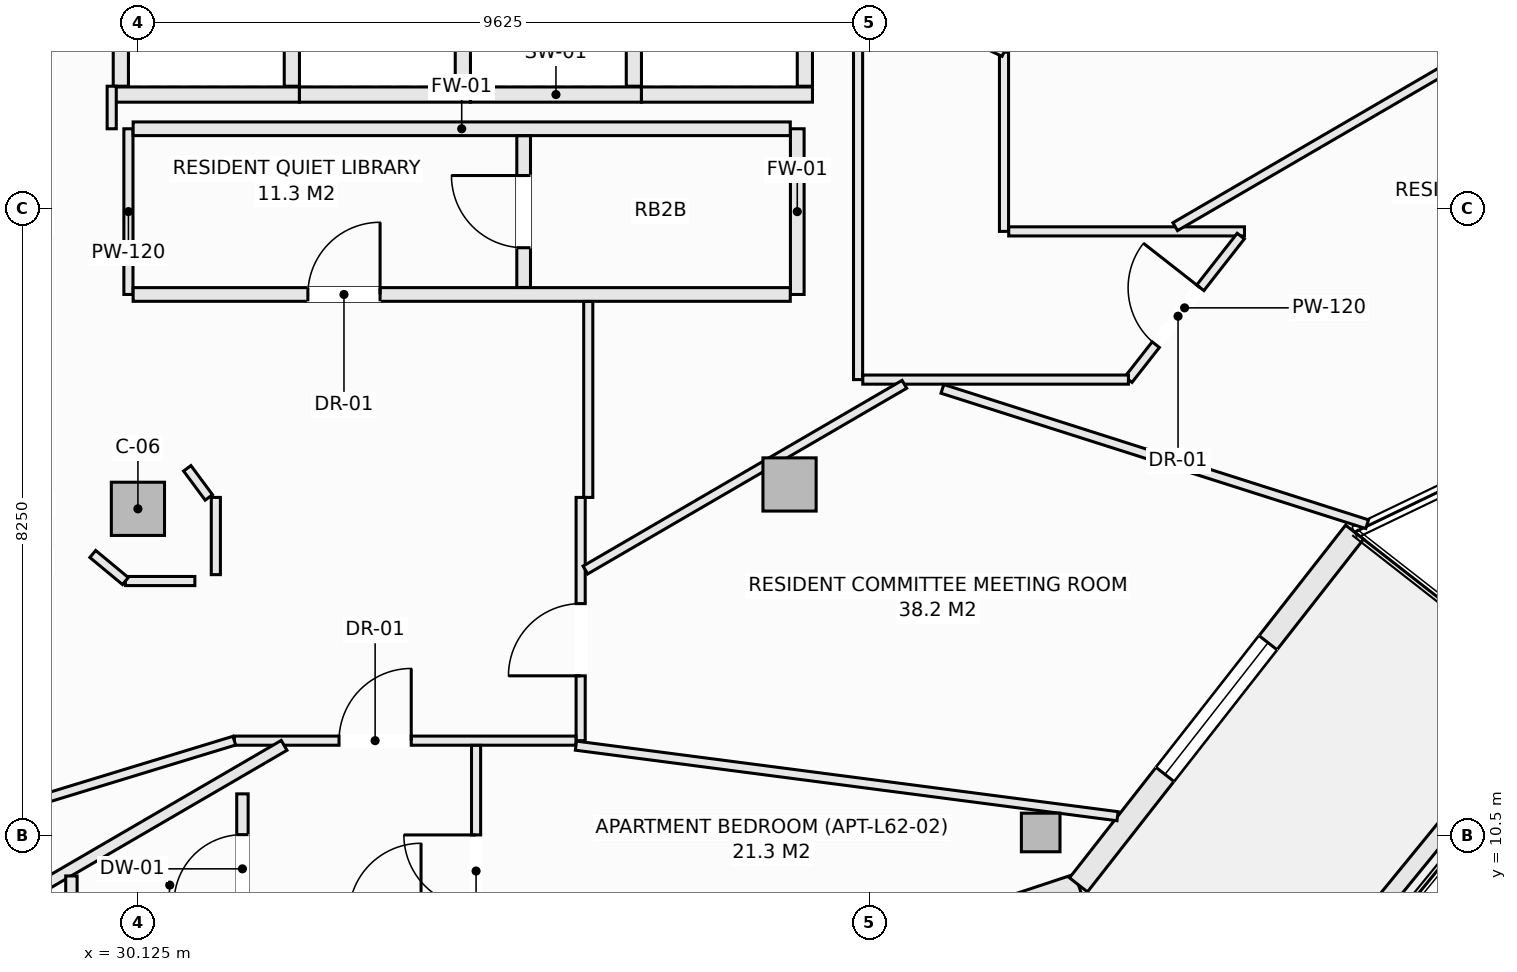
"""IFC4 building model, lengths in metres.
Left out: names, types, materials, properties, quantities, classifications, styles, units other than length and angle.
Written with IfcOpenShell. Run it as: python <this file> out.ifc"""

import sys

from ifc_helpers import new_model, si_unit, direction, frame, frame_2d, origin, origin_2d, place, context, subcontext, project, spatial, rectangle, hollow_rectangle, extrude, element, fill, save


model = new_model("IFC4")
c1 = context("Model", 3, precision=1e-05, world=origin(), true_north=direction((0.0, 1.0)))
c2 = subcontext(c1, "Body", "Model", "MODEL_VIEW")
j1 = project(units=[si_unit("LENGTHUNIT", "METRE"), si_unit("PLANEANGLEUNIT", "RADIAN")], contexts=[c1])
p1 = place(None, origin())
s1 = spatial("IfcSite", under=j1, at=p1, CompositionType="ELEMENT")
p2 = place(p1, origin())
s2 = spatial("IfcBuilding", under=s1, at=p2, CompositionType="ELEMENT")
p3 = place(p2, frame((0.0, 0.0, 232.7)))
s3 = spatial("IfcBuildingStorey", under=s2, at=p3, CompositionType="ELEMENT", Elevation=232.7)
p4 = place(p3, frame((42.003, 10.542, -0.27), z_axis=(0.0, 0.0, 1.0), x_axis=(1.0, 0.0, 0.0)))
e1 = element("IfcColumn", 1, at=p4, inside=s3, PredefinedType="COLUMN", context=c2, shape_type="SweptSolid", body=[
    extrude(hollow_rectangle(XDim=0.508, YDim=0.508, WallThickness=0.019, at=origin_2d()), origin(), (0.0, 0.0, 1.0), 3.3),
])
for number, where, z_axis, x_axis in (
    (2, (30.125, 14.8, -0.27), (0.0, 0.0, 1.0), (1.0, 0.0, 0.0)),
    (3, (38.698, 15.121, -0.27), (0.0, 0.0, 1.0), (1.0, 0.0, 0.0)),
):
    element("IfcColumn", number, at=place(p3, frame(where, z_axis=z_axis, x_axis=x_axis)), inside=s3, PredefinedType="COLUMN", context=c2, shape_type="SweptSolid", body=[
        extrude(rectangle(XDim=0.7, YDim=0.7, at=origin_2d()), origin(), (0.0, 0.0, 1.0), 3.3),
    ])
p5 = place(p3, frame((36.531, 7.875, 0.0), z_axis=(0.0, 0.0, 1.0), x_axis=(0.949240877604, 0.314550085495, 0.0)))
e4 = element("IfcWall", 4, at=p5, inside=s3, PredefinedType="SOLIDWALL", context=c2, shape_type="SweptSolid", body=[
    extrude(rectangle(XDim=6.288, YDim=0.3, at=frame_2d((3.144, 0.0))), origin(), (0.0, 0.0, 1.0), 2.605),
])
p6 = place(p5, frame((2.244, 0.0, 0.0)))
e5 = element("IfcOpeningElement", 5, at=p6, cuts=e4, PredefinedType="OPENING", context=c2, shape_type="SweptSolid", body=[
    extrude(rectangle(XDim=1.8, YDim=2.25, at=frame_2d((0.9, 1.125))), frame((0.0, 0.16, 0.0), z_axis=(0.0, -1.0, 0.0), x_axis=(1.0, 0.0, 0.0)), (0.0, 0.0, 1.0), 0.32),
])
p7 = place(p3, frame((42.5, 9.853, 0.0), z_axis=(0.0, 0.0, 1.0), x_axis=(0.616450126935, 0.787393955401, 0.0)))
e6 = element("IfcWall", 6, at=p7, inside=s3, PredefinedType="SOLIDWALL", context=c2, shape_type="SweptSolid", body=[
    extrude(rectangle(XDim=5.893, YDim=0.3, at=frame_2d((2.946, 0.0))), origin(), (0.0, 0.0, 1.0), 2.605),
])
p8 = place(p7, frame((1.846, 0.0, 0.72)))
e7 = element("IfcOpeningElement", 7, at=p8, cuts=e6, PredefinedType="OPENING", context=c2, shape_type="SweptSolid", body=[
    extrude(rectangle(XDim=2.2, YDim=1.65, at=frame_2d((1.1, 0.825))), frame((0.0, 0.16, 0.0), z_axis=(0.0, -1.0, 0.0), x_axis=(1.0, 0.0, 0.0)), (0.0, 0.0, 1.0), 0.32),
])
p9 = place(p3, frame((44.448, 7.087, 0.0), z_axis=(0.0, 0.0, 1.0), x_axis=(0.632697312147, 0.774399193699, 0.0)))
e8 = element("IfcWall", 8, at=p9, inside=s3, PredefinedType="PARAPET", context=c2, shape_type="SweptSolid", body=[
    extrude(rectangle(XDim=6.914, YDim=0.22, at=frame_2d((3.457, 0.0))), origin(), (0.0, 0.0, 1.0), 0.52),
])
p10 = place(p3, frame((29.8, 20.25, 0.0), z_axis=(0.0, 0.0, 1.0), x_axis=(1.0, 0.0, 0.0)))
e9 = element("IfcWall", 9, at=p10, inside=s3, PredefinedType="SOLIDWALL", context=c2, shape_type="SweptSolid", body=[
    extrude(rectangle(XDim=2.45, YDim=0.2, at=frame_2d((1.225, 0.0))), origin(), (0.0, 0.0, 1.0), 3.03),
])
for number, where, z_axis, x_axis in (
    (10, (29.9, 20.36, 0.0), (0.0, 0.0, 1.0), (0.0, 1.0, 0.0)),
    (11, (32.15, 20.36, 0.0), (0.0, 0.0, 1.0), (0.0, 1.0, 0.0)),
):
    element("IfcWall", number, at=place(p3, frame(where, z_axis=z_axis, x_axis=x_axis)), inside=s3, PredefinedType="SOLIDWALL", context=c2, shape_type="SweptSolid", body=[
        extrude(rectangle(XDim=2.43, YDim=0.2, at=frame_2d((1.215, 0.0))), origin(), (0.0, 0.0, 1.0), 3.03),
    ])
p11 = place(p3, frame((32.25, 20.25, 0.0), z_axis=(0.0, 0.0, 1.0), x_axis=(1.0, 0.0, 0.0)))
e12 = element("IfcWall", 12, at=p11, inside=s3, PredefinedType="SOLIDWALL", context=c2, shape_type="SweptSolid", body=[
    extrude(rectangle(XDim=2.25, YDim=0.2, at=frame_2d((1.125, 0.0))), origin(), (0.0, 0.0, 1.0), 3.03),
])
p12 = place(p3, frame((34.4, 20.36, 0.0), z_axis=(0.0, 0.0, 1.0), x_axis=(0.0, 1.0, 0.0)))
e13 = element("IfcWall", 13, at=p12, inside=s3, PredefinedType="SOLIDWALL", context=c2, shape_type="SweptSolid", body=[
    extrude(rectangle(XDim=2.43, YDim=0.2, at=frame_2d((1.215, 0.0))), origin(), (0.0, 0.0, 1.0), 3.03),
])
p13 = place(p3, frame((34.5, 20.25, 0.0), z_axis=(0.0, 0.0, 1.0), x_axis=(1.0, 0.0, 0.0)))
e14 = element("IfcWall", 14, at=p13, inside=s3, PredefinedType="SOLIDWALL", context=c2, shape_type="SweptSolid", body=[
    extrude(rectangle(XDim=2.25, YDim=0.2, at=frame_2d((1.125, 0.0))), origin(), (0.0, 0.0, 1.0), 3.03),
])
p14 = place(p3, frame((36.65, 20.36, 0.0), z_axis=(0.0, 0.0, 1.0), x_axis=(0.0, 1.0, 0.0)))
e15 = element("IfcWall", 15, at=p14, inside=s3, PredefinedType="SOLIDWALL", context=c2, shape_type="SweptSolid", body=[
    extrude(rectangle(XDim=2.43, YDim=0.2, at=frame_2d((1.215, 0.0))), origin(), (0.0, 0.0, 1.0), 3.03),
])
p15 = place(p3, frame((36.75, 20.25, 0.0), z_axis=(0.0, 0.0, 1.0), x_axis=(1.0, 0.0, 0.0)))
e16 = element("IfcWall", 16, at=p15, inside=s3, PredefinedType="SOLIDWALL", context=c2, shape_type="SweptSolid", body=[
    extrude(rectangle(XDim=2.25, YDim=0.2, at=frame_2d((1.125, 0.0))), origin(), (0.0, 0.0, 1.0), 3.03),
])
p16 = place(p3, frame((38.9, 20.36, 0.0), z_axis=(0.0, 0.0, 1.0), x_axis=(0.0, 1.0, 0.0)))
e17 = element("IfcWall", 17, at=p16, inside=s3, PredefinedType="SOLIDWALL", context=c2, shape_type="SweptSolid", body=[
    extrude(rectangle(XDim=2.43, YDim=0.2, at=frame_2d((1.215, 0.0))), origin(), (0.0, 0.0, 1.0), 3.03),
])
p17 = place(p3, frame((30.0, 17.62, 0.0), z_axis=(0.0, 0.0, 1.0), x_axis=(0.0, 1.0, 0.0)))
e18 = element("IfcWall", 18, at=p17, inside=s3, PredefinedType="PARTITIONING", context=c2, shape_type="SweptSolid", body=[
    extrude(rectangle(XDim=2.18, YDim=0.12, at=frame_2d((1.09, 0.0))), origin(), (0.0, 0.0, 1.0), 3.03),
])
p18 = place(p3, frame((38.8, 17.62, 0.0), z_axis=(0.0, 0.0, 1.0), x_axis=(0.0, 1.0, 0.0)))
e19 = element("IfcWall", 19, at=p18, inside=s3, PredefinedType="SOLIDWALL", context=c2, shape_type="SweptSolid", body=[
    extrude(rectangle(XDim=2.18, YDim=0.18, at=frame_2d((1.09, 0.0))), origin(), (0.0, 0.0, 1.0), 3.03),
])
p19 = place(p3, frame((30.062, 17.62, 0.0), z_axis=(0.0, 0.0, 1.0), x_axis=(1.0, 0.0, 0.0)))
e20 = element("IfcWall", 20, at=p19, inside=s3, PredefinedType="SOLIDWALL", context=c2, shape_type="SweptSolid", body=[
    extrude(rectangle(XDim=8.646, YDim=0.18, at=frame_2d((4.323, 0.0))), origin(), (0.0, 0.0, 1.0), 3.03),
])
p20 = place(p19, frame((2.299, 0.0, 0.0)))
e21 = element("IfcOpeningElement", 21, at=p20, cuts=e20, PredefinedType="OPENING", context=c2, shape_type="SweptSolid", body=[
    extrude(rectangle(XDim=0.95, YDim=2.1, at=frame_2d((0.475, 1.05))), frame((0.0, 0.1, 0.0), z_axis=(0.0, -1.0, 0.0), x_axis=(1.0, 0.0, 0.0)), (0.0, 0.0, 1.0), 0.2),
])
p21 = place(p3, frame((30.062, 19.8, 0.0), z_axis=(0.0, 0.0, 1.0), x_axis=(1.0, 0.0, 0.0)))
e22 = element("IfcWall", 22, at=p21, inside=s3, PredefinedType="SOLIDWALL", context=c2, shape_type="SweptSolid", body=[
    extrude(rectangle(XDim=8.646, YDim=0.18, at=frame_2d((4.323, 0.0))), origin(), (0.0, 0.0, 1.0), 3.03),
])
p22 = place(p3, frame((35.2, 17.712, 0.0), z_axis=(0.0, 0.0, 1.0), x_axis=(0.0, 1.0, 0.0)))
e23 = element("IfcWall", 23, at=p22, inside=s3, PredefinedType="SOLIDWALL", context=c2, shape_type="SweptSolid", body=[
    extrude(rectangle(XDim=1.996, YDim=0.18, at=frame_2d((0.998, 0.0))), origin(), (0.0, 0.0, 1.0), 3.03),
])
p23 = place(p22, frame((0.523, 0.0, 0.0)))
e24 = element("IfcOpeningElement", 24, at=p23, cuts=e23, PredefinedType="OPENING", context=c2, shape_type="SweptSolid", body=[
    extrude(rectangle(XDim=0.95, YDim=2.1, at=frame_2d((0.475, 1.05))), frame((0.0, 0.1, 0.0), z_axis=(0.0, -1.0, 0.0), x_axis=(1.0, 0.0, 0.0)), (0.0, 0.0, 1.0), 0.2),
])
p24 = place(p3, frame((39.6, 16.5, 0.0), z_axis=(0.0, 0.0, 1.0), x_axis=(0.0, 1.0, 0.0)))
e25 = element("IfcWall", 25, at=p24, inside=s3, PredefinedType="PARTITIONING", context=c2, shape_type="SweptSolid", body=[
    extrude(rectangle(XDim=6.52, YDim=0.12, at=frame_2d((3.26, 0.0))), origin(), (0.0, 0.0, 1.0), 2.478),
])
p25 = place(p3, frame((41.52, 18.45, 0.0), z_axis=(0.0, 0.0, 1.0), x_axis=(0.0, 1.0, 0.0)))
e26 = element("IfcWall", 26, at=p25, inside=s3, PredefinedType="PARTITIONING", context=c2, shape_type="SweptSolid", body=[
    extrude(rectangle(XDim=2.357, YDim=0.12, at=frame_2d((1.178, 0.0))), origin(), (0.0, 0.0, 1.0), 3.03),
])
p26 = place(p3, frame((40.986, 21.06, 0.0), z_axis=(0.0, 0.0, 1.0), x_axis=(0.90356951601, -0.428441512621, 0.0)))
e27 = element("IfcWall", 27, at=p26, inside=s3, PredefinedType="PARTITIONING", context=c2, shape_type="SweptSolid", body=[
    extrude(rectangle(XDim=0.591, YDim=0.12, at=frame_2d((0.295, 0.0))), origin(), (0.0, 0.0, 1.0), 3.03),
])
p27 = place(p3, frame((41.582, 18.45, 0.0), z_axis=(0.0, 0.0, 1.0), x_axis=(1.0, 0.0, 0.0)))
e28 = element("IfcWall", 28, at=p27, inside=s3, PredefinedType="PARTITIONING", context=c2, shape_type="SweptSolid", body=[
    extrude(rectangle(XDim=3.102, YDim=0.12, at=frame_2d((1.551, 0.0))), origin(), (0.0, 0.0, 1.0), 3.03),
])
p28 = place(p3, frame((43.157, 16.5, 0.0), z_axis=(0.0, 0.0, 1.0), x_axis=(0.616566276607, 0.787303008092, 0.0)))
e29 = element("IfcWall", 29, at=p28, inside=s3, PredefinedType="PARTITIONING", context=c2, shape_type="SweptSolid", body=[
    extrude(rectangle(XDim=2.398, YDim=0.12, at=frame_2d((1.199, 0.0))), origin(), (0.0, 0.0, 1.0), 3.03),
])
p29 = place(p28, frame((0.584, 0.0, 0.0)))
e30 = element("IfcOpeningElement", 30, at=p29, cuts=e29, PredefinedType="OPENING", context=c2, shape_type="SweptSolid", body=[
    extrude(rectangle(XDim=0.95, YDim=2.1, at=frame_2d((0.475, 1.05))), frame((0.0, 0.07, 0.0), z_axis=(0.0, -1.0, 0.0), x_axis=(1.0, 0.0, 0.0)), (0.0, 0.0, 1.0), 0.14),
])
p30 = place(p3, frame((39.662, 16.5, 0.0), z_axis=(0.0, 0.0, 1.0), x_axis=(1.0, 0.0, 0.0)))
e31 = element("IfcWall", 31, at=p30, inside=s3, PredefinedType="PARTITIONING", context=c2, shape_type="SweptSolid", body=[
    extrude(rectangle(XDim=3.495, YDim=0.12, at=frame_2d((1.748, 0.0))), origin(), (0.0, 0.0, 1.0), 2.77),
])
p31 = place(p3, frame((29.78, 19.8, 0.0), z_axis=(0.0, 0.0, 1.0), x_axis=(0.0, 1.0, 0.0)))
e32 = element("IfcWall", 32, at=p31, inside=s3, PredefinedType="PARTITIONING", context=c2, shape_type="SweptSolid", body=[
    extrude(rectangle(XDim=0.56, YDim=0.12, at=frame_2d((0.28, 0.0))), origin(), (0.0, 0.0, 1.0), 3.03),
])
p32 = place(p3, frame((36.05, 14.95, 0.0), z_axis=(0.0, 0.0, 1.0), x_axis=(0.0, 1.0, 0.0)))
e33 = element("IfcWall", 33, at=p32, inside=s3, PredefinedType="PARTITIONING", context=c2, shape_type="SweptSolid", body=[
    extrude(rectangle(XDim=2.578, YDim=0.12, at=frame_2d((1.289, 0.0))), origin(), (0.0, 0.0, 1.0), 3.03),
])
p33 = place(p3, frame((35.95, 11.75, 0.0), z_axis=(0.0, 0.0, 1.0), x_axis=(0.0, 1.0, 0.0)))
e34 = element("IfcWall", 34, at=p33, inside=s3, PredefinedType="PARTITIONING", context=c2, shape_type="SweptSolid", body=[
    extrude(rectangle(XDim=3.2, YDim=0.12, at=frame_2d((1.6, 0.0))), origin(), (0.0, 0.0, 1.0), 3.03),
])
p34 = place(p33, frame((0.853, 0.0, 0.0)))
e35 = element("IfcOpeningElement", 35, at=p34, cuts=e34, PredefinedType="OPENING", context=c2, shape_type="SweptSolid", body=[
    extrude(rectangle(XDim=0.95, YDim=2.1, at=frame_2d((0.475, 1.05))), frame((0.0, 0.07, 0.0), z_axis=(0.0, -1.0, 0.0), x_axis=(1.0, 0.0, 0.0)), (0.0, 0.0, 1.0), 0.14),
])
p35 = place(p3, frame((31.393, 11.75, 0.0), z_axis=(0.0, 0.0, 1.0), x_axis=(1.0, 0.0, 0.0)))
e36 = element("IfcWall", 36, at=p35, inside=s3, PredefinedType="PARTITIONING", context=c2, shape_type="SweptSolid", body=[
    extrude(rectangle(XDim=4.495, YDim=0.12, at=frame_2d((2.248, 0.0))), origin(), (0.0, 0.0, 1.0), 3.03),
])
p36 = place(p35, frame((1.378, 0.0, 0.0)))
e37 = element("IfcOpeningElement", 37, at=p36, cuts=e36, PredefinedType="OPENING", context=c2, shape_type="SweptSolid", body=[
    extrude(rectangle(XDim=0.95, YDim=2.1, at=frame_2d((0.475, 1.05))), frame((0.0, 0.07, 0.0), z_axis=(0.0, -1.0, 0.0), x_axis=(1.0, 0.0, 0.0)), (0.0, 0.0, 1.0), 0.14),
])
p37 = place(p3, frame((28.752, 10.944, 0.0), z_axis=(0.0, 0.0, 1.0), x_axis=(0.956462690075, 0.291854625618, 0.0)))
e38 = element("IfcWall", 38, at=p37, inside=s3, PredefinedType="PARTITIONING", context=c2, shape_type="SweptSolid", body=[
    extrude(rectangle(XDim=2.761, YDim=0.12, at=frame_2d((1.381, 0.0))), origin(), (0.0, 0.0, 1.0), 3.03),
])
p38 = place(p3, frame((29.96, 13.85, 0.0), z_axis=(0.0, 0.0, 1.0), x_axis=(1.0, 0.0, 0.0)))
e39 = element("IfcWall", 39, at=p38, inside=s3, PredefinedType="PARTITIONING", context=c2, shape_type="SweptSolid", body=[
    extrude(rectangle(XDim=0.914, YDim=0.12, at=frame_2d((0.457, 0.0))), origin(), (0.0, 0.0, 1.0), 3.03),
])
p39 = place(p3, frame((31.15, 13.934, 0.0), z_axis=(0.0, 0.0, 1.0), x_axis=(0.0, 1.0, 0.0)))
e40 = element("IfcWall", 40, at=p39, inside=s3, PredefinedType="PARTITIONING", context=c2, shape_type="SweptSolid", body=[
    extrude(rectangle(XDim=1.016, YDim=0.12, at=frame_2d((0.508, 0.0))), origin(), (0.0, 0.0, 1.0), 3.03),
])
p40 = place(p3, frame((30.774, 15.333, 0.0), z_axis=(0.0, 0.0, 1.0), x_axis=(0.595814974861, -0.803121731577, 0.0)))
e41 = element("IfcWall", 41, at=p40, inside=s3, PredefinedType="PARTITIONING", context=c2, shape_type="SweptSolid", body=[
    extrude(rectangle(XDim=0.477, YDim=0.12, at=frame_2d((0.239, 0.0))), origin(), (0.0, 0.0, 1.0), 3.03),
])
p41 = place(p3, frame((29.531, 14.206, 0.0), z_axis=(0.0, 0.0, 1.0), x_axis=(0.7695479554, -0.638589026166, 0.0)))
e42 = element("IfcWall", 42, at=p41, inside=s3, PredefinedType="PARTITIONING", context=c2, shape_type="SweptSolid", body=[
    extrude(rectangle(XDim=0.557, YDim=0.12, at=frame_2d((0.279, 0.0))), origin(), (0.0, 0.0, 1.0), 3.03),
])
p42 = place(p3, frame((25.447, 7.846, 0.0), z_axis=(0.0, 0.0, 1.0), x_axis=(0.864278106544, 0.503014268732, 0.0)))
e43 = element("IfcWall", 43, at=p42, inside=s3, PredefinedType="PARTITIONING", context=c2, shape_type="SweptSolid", body=[
    extrude(rectangle(XDim=7.638, YDim=0.15, at=frame_2d((3.819, 0.0))), origin(), (0.0, 0.0, 1.0), 3.03),
])
p43 = place(p3, frame((36.012, 13.995, 0.0), z_axis=(0.0, 0.0, 1.0), x_axis=(0.864278013608, 0.503014428415, 0.0)))
e44 = element("IfcWall", 44, at=p43, inside=s3, PredefinedType="PARTITIONING", context=c2, shape_type="SweptSolid", body=[
    extrude(rectangle(XDim=4.857, YDim=0.12, at=frame_2d((2.428, 0.0))), origin(), (0.0, 0.0, 1.0), 2.478),
])
p44 = place(p3, frame((43.773, 18.512, 0.0), z_axis=(0.0, 0.0, 1.0), x_axis=(0.864261022419, 0.503043621495, 0.0)))
e45 = element("IfcWall", 45, at=p44, inside=s3, PredefinedType="PARTITIONING", context=c2, shape_type="SweptSolid", body=[
    extrude(rectangle(XDim=12.222, YDim=0.12, at=frame_2d((6.111, 0.0))), origin(), (0.0, 0.0, 1.0), 3.03),
])
p45 = place(p3, frame((34.574, 7.821, 0.0), z_axis=(0.0, 0.0, 1.0), x_axis=(0.0, 1.0, 0.0)))
e46 = element("IfcWall", 46, at=p45, inside=s3, PredefinedType="PARTITIONING", context=c2, shape_type="SweptSolid", body=[
    extrude(rectangle(XDim=3.867, YDim=0.12, at=frame_2d((1.933, 0.0))), origin(), (0.0, 0.0, 1.0), 3.03),
])
p46 = place(p45, frame((1.738, 0.0, 0.0)))
e47 = element("IfcOpeningElement", 47, at=p46, cuts=e46, PredefinedType="OPENING", context=c2, shape_type="SweptSolid", body=[
    extrude(rectangle(XDim=0.95, YDim=2.1, at=frame_2d((0.475, 1.05))), frame((0.0, 0.07, 0.0), z_axis=(0.0, -1.0, 0.0), x_axis=(1.0, 0.0, 0.0)), (0.0, 0.0, 1.0), 0.14),
])
p47 = place(p3, frame((29.25, 9.0, 0.0), z_axis=(0.0, 0.0, 1.0), x_axis=(0.0, 1.0, 0.0)))
e48 = element("IfcWall", 48, at=p47, inside=s3, PredefinedType="PARTITIONING", context=c2, shape_type="SweptSolid", body=[
    extrude(rectangle(XDim=0.97, YDim=0.15, at=frame_2d((0.485, 0.0))), origin(), (0.0, 0.0, 1.0), 3.03),
])
p48 = place(p3, frame((31.5, 9.077, 0.0), z_axis=(0.0, 0.0, 1.0), x_axis=(0.0, 1.0, 0.0)))
e49 = element("IfcWall", 49, at=p48, inside=s3, PredefinedType="PARTITIONING", context=c2, shape_type="SweptSolid", body=[
    extrude(rectangle(XDim=1.973, YDim=0.15, at=frame_2d((0.987, 0.0))), origin(), (0.0, 0.0, 1.0), 3.03),
])
p49 = place(p48, frame((0.537, 0.0, 0.0)))
e50 = element("IfcOpeningElement", 50, at=p49, cuts=e49, PredefinedType="OPENING", context=c2, shape_type="SweptSolid", body=[
    extrude(rectangle(XDim=0.9, YDim=2.1, at=frame_2d((0.45, 1.05))), frame((0.0, 0.085, 0.0), z_axis=(0.0, -1.0, 0.0), x_axis=(1.0, 0.0, 0.0)), (0.0, 0.0, 1.0), 0.17),
])
p50 = place(p3, frame((35.888, 11.684, 0.0), z_axis=(0.0, 0.0, 1.0), x_axis=(0.991622750781, -0.129167798358, 0.0)))
e51 = element("IfcWall", 51, at=p50, inside=s3, PredefinedType="PARTITIONING", context=c2, shape_type="SweptSolid", body=[
    extrude(rectangle(XDim=7.186, YDim=0.12, at=frame_2d((3.593, 0.0))), origin(), (0.0, 0.0, 1.0), 3.03),
])
p51 = place(p3, frame((40.709, 16.378, 0.0), z_axis=(0.0, 0.0, 1.0), x_axis=(0.952839371161, -0.303475094144, 0.0)))
e52 = element("IfcWall", 52, at=p51, inside=s3, PredefinedType="PARTITIONING", context=c2, shape_type="SweptSolid", body=[
    extrude(rectangle(XDim=5.865, YDim=0.12, at=frame_2d((2.933, 0.0))), origin(), (0.0, 0.0, 1.0), 2.77),
])
p52 = place(p8, origin())
e53 = element("IfcWindow", 53, at=p52, inside=s3, PartitioningType="SINGLE_PANEL", PredefinedType="WINDOW", context=c2, shape_type="SweptSolid", body=[
    extrude(rectangle(XDim=2.2, YDim=1.65, at=frame_2d((1.1, 0.825))), frame((0.0, 0.03, 0.0), z_axis=(0.0, -1.0, 0.0), x_axis=(1.0, 0.0, 0.0)), (0.0, 0.0, 1.0), 0.06),
])
fill(e7, e53)
p53 = place(p20, origin())
e54 = element("IfcDoor", 54, at=p53, inside=s3, OperationType="SINGLE_SWING_RIGHT", PredefinedType="DOOR", context=c2, shape_type="SweptSolid", body=[
    extrude(rectangle(XDim=0.95, YDim=2.1, at=frame_2d((0.475, 1.05))), frame((0.0, 0.025, 0.0), z_axis=(0.0, -1.0, 0.0), x_axis=(1.0, 0.0, 0.0)), (0.0, 0.0, 1.0), 0.05),
])
fill(e21, e54)
p54 = place(p36, origin())
e55 = element("IfcDoor", 55, at=p54, inside=s3, OperationType="SINGLE_SWING_RIGHT", PredefinedType="DOOR", context=c2, shape_type="SweptSolid", body=[
    extrude(rectangle(XDim=0.95, YDim=2.1, at=frame_2d((0.475, 1.05))), frame((0.0, 0.025, 0.0), z_axis=(0.0, -1.0, 0.0), x_axis=(1.0, 0.0, 0.0)), (0.0, 0.0, 1.0), 0.05),
])
fill(e37, e55)
p55 = place(p34, origin())
e56 = element("IfcDoor", 56, at=p55, inside=s3, OperationType="SINGLE_SWING_LEFT", PredefinedType="DOOR", context=c2, shape_type="SweptSolid", body=[
    extrude(rectangle(XDim=0.95, YDim=2.1, at=frame_2d((0.475, 1.05))), frame((0.0, 0.025, 0.0), z_axis=(0.0, -1.0, 0.0), x_axis=(1.0, 0.0, 0.0)), (0.0, 0.0, 1.0), 0.05),
])
fill(e35, e56)
p56 = place(p29, origin())
e57 = element("IfcDoor", 57, at=p56, inside=s3, OperationType="SINGLE_SWING_RIGHT", PredefinedType="DOOR", context=c2, shape_type="SweptSolid", body=[
    extrude(rectangle(XDim=0.95, YDim=2.1, at=frame_2d((0.475, 1.05))), frame((0.0, 0.025, 0.0), z_axis=(0.0, -1.0, 0.0), x_axis=(1.0, 0.0, 0.0)), (0.0, 0.0, 1.0), 0.05),
])
fill(e30, e57)
p57 = place(p49, origin())
e58 = element("IfcDoor", 58, at=p57, inside=s3, OperationType="SINGLE_SWING_LEFT", PredefinedType="DOOR", context=c2, shape_type="SweptSolid", body=[
    extrude(rectangle(XDim=0.9, YDim=2.1, at=frame_2d((0.45, 1.05))), frame((0.0, 0.025, 0.0), z_axis=(0.0, -1.0, 0.0), x_axis=(1.0, 0.0, 0.0)), (0.0, 0.0, 1.0), 0.05),
])
fill(e50, e58)
p58 = place(p46, origin())
e59 = element("IfcDoor", 59, at=p58, inside=s3, OperationType="SINGLE_SWING_RIGHT", PredefinedType="DOOR", context=c2, shape_type="SweptSolid", body=[
    extrude(rectangle(XDim=0.95, YDim=2.1, at=frame_2d((0.475, 1.05))), frame((0.0, 0.025, 0.0), z_axis=(0.0, -1.0, 0.0), x_axis=(1.0, 0.0, 0.0)), (0.0, 0.0, 1.0), 0.05),
])
fill(e47, e59)
p59 = place(p23, origin())
e60 = element("IfcDoor", 60, at=p59, inside=s3, OperationType="SINGLE_SWING_RIGHT", PredefinedType="DOOR", context=c2, shape_type="SweptSolid", body=[
    extrude(rectangle(XDim=0.95, YDim=2.1, at=frame_2d((0.475, 1.05))), frame((0.0, 0.025, 0.0), z_axis=(0.0, -1.0, 0.0), x_axis=(1.0, 0.0, 0.0)), (0.0, 0.0, 1.0), 0.05),
])
fill(e24, e60)
save(model, sys.argv[1])
